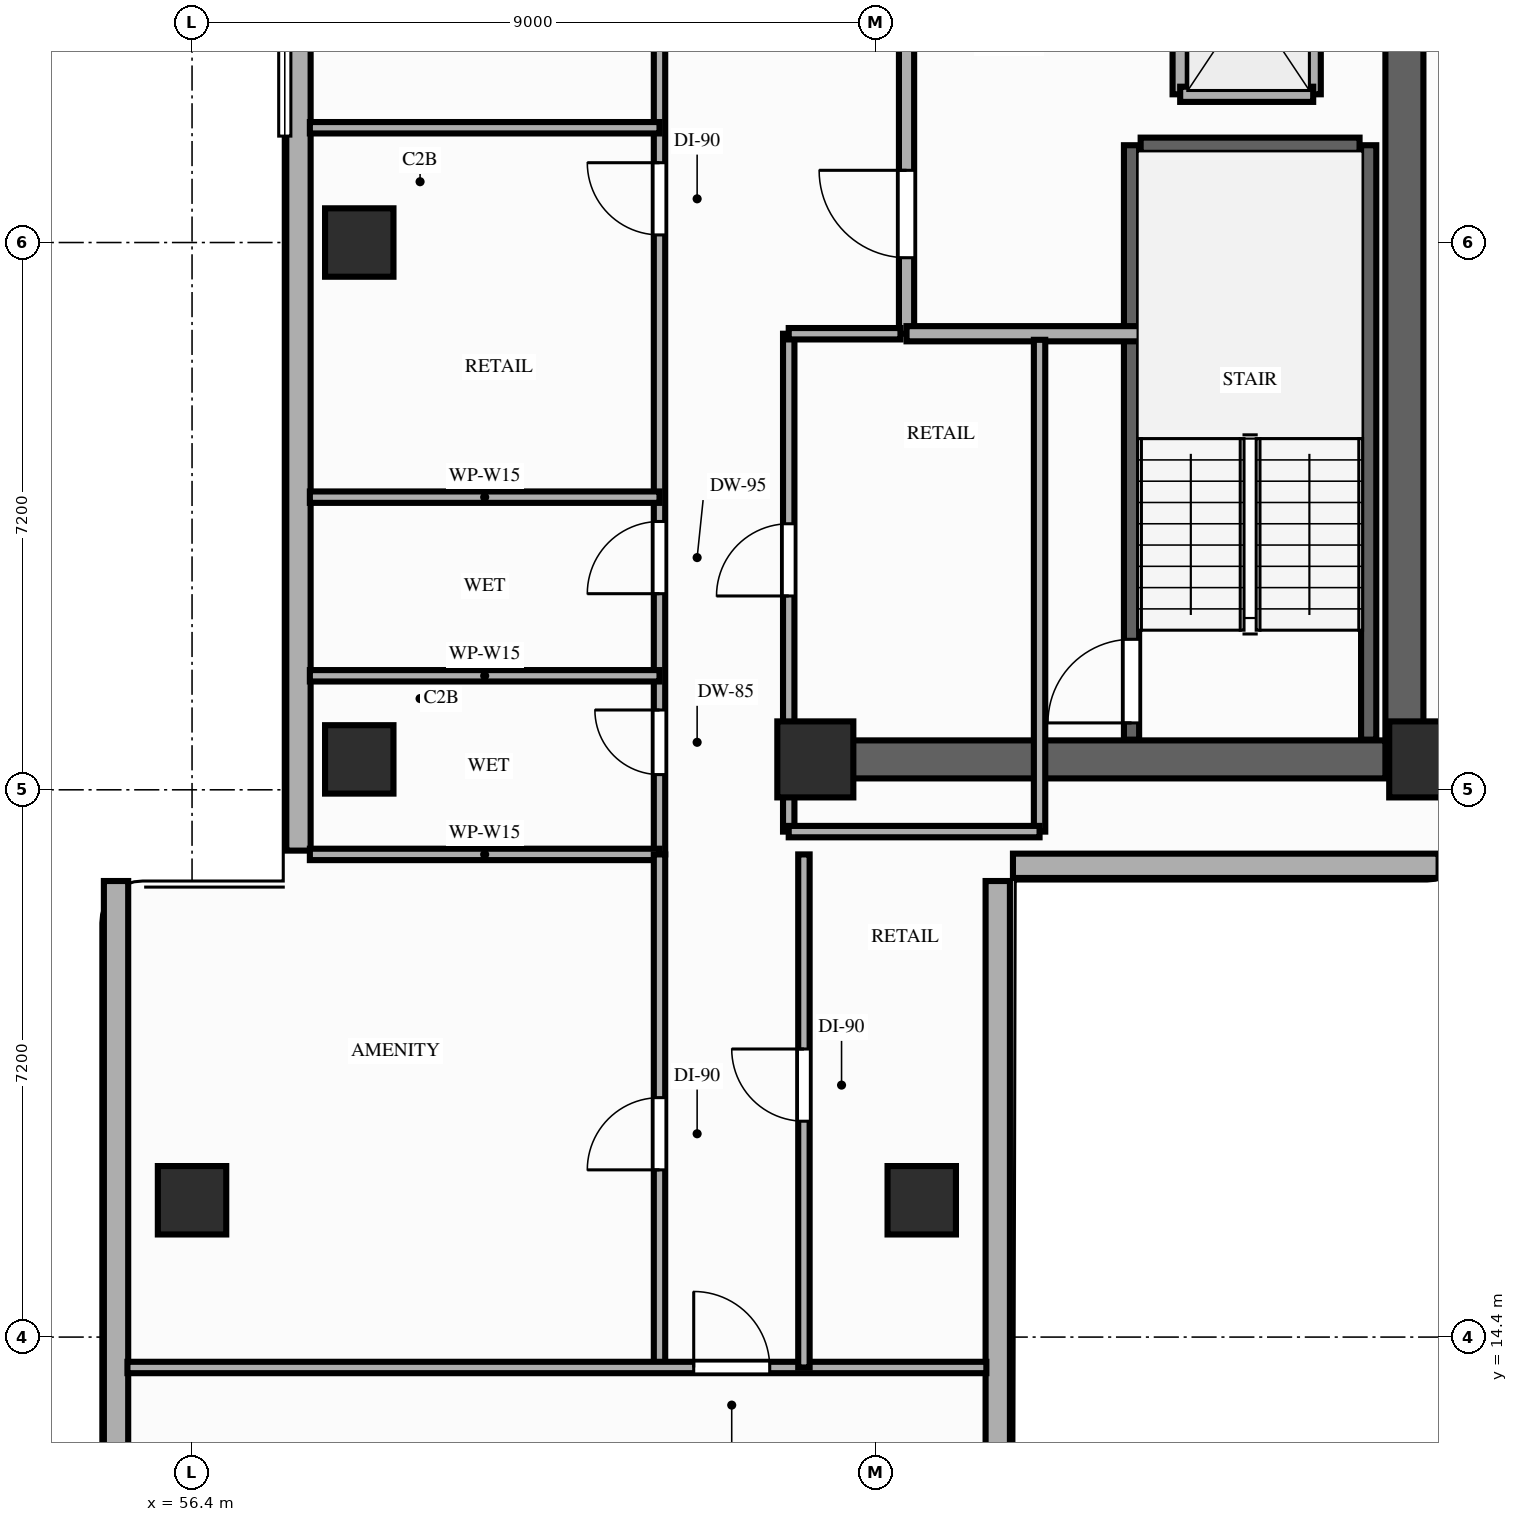
"""IFC4 building model, lengths in metres.
Left out: names, types, materials, properties, quantities, classifications, styles, units other than length and angle.
Written with IfcOpenShell. Run it as: python <this file> out.ifc"""

import sys

from ifc_helpers import new_model, si_unit, direction, frame, frame_2d, origin, origin_2d, place, context, subcontext, project, spatial, rectangle, extrude, element, fill, save


model = new_model("IFC4")
c1 = context("Model", 3, precision=1e-05, world=origin(), true_north=direction((0.0, 1.0)))
c2 = subcontext(c1, "Body", "Model", "MODEL_VIEW")
j1 = project(units=[si_unit("LENGTHUNIT", "METRE"), si_unit("PLANEANGLEUNIT", "RADIAN")], contexts=[c1])
p1 = place(None, origin())
s1 = spatial("IfcSite", under=j1, at=p1, CompositionType="ELEMENT")
p2 = place(p1, origin())
s2 = spatial("IfcBuilding", under=s1, at=p2, CompositionType="ELEMENT")
p3 = place(p2, frame((0.0, 0.0, 56.4)))
s3 = spatial("IfcBuildingStorey", under=s2, at=p3, CompositionType="ELEMENT", Elevation=56.4)
for number, where, z_axis, x_axis in (
    (1, (64.6, 22.0, 0.0), (0.0, 0.0, 1.0), (1.0, 0.0, 0.0)),
    (2, (72.65, 22.0, 0.0), (0.0, 0.0, 1.0), (1.0, 0.0, 0.0)),
):
    element("IfcColumn", number, at=place(p3, frame(where, z_axis=z_axis, x_axis=x_axis)), inside=s3, PredefinedType="COLUMN", context=c2, shape_type="SweptSolid", body=[
        extrude(rectangle(XDim=1.0, YDim=1.0, at=origin_2d()), origin(), (0.0, 0.0, 1.0), 3.2),
    ])
for number, where, z_axis, x_axis in (
    (3, (58.6, 22.0, 0.0), (0.0, 0.0, 1.0), (1.0, 0.0, 0.0)),
    (4, (58.6, 28.8, 0.0), (0.0, 0.0, 1.0), (1.0, 0.0, 0.0)),
    (5, (56.4, 16.2, 0.0), (0.0, 0.0, 1.0), (1.0, 0.0, 0.0)),
    (6, (66.0, 16.2, 0.0), (0.0, 0.0, 1.0), (1.0, 0.0, 0.0)),
):
    element("IfcColumn", number, at=place(p3, frame(where, z_axis=z_axis, x_axis=x_axis)), inside=s3, PredefinedType="COLUMN", context=c2, shape_type="SweptSolid", body=[
        extrude(rectangle(XDim=0.9, YDim=0.9, at=origin_2d()), origin(), (0.0, 0.0, 1.0), 3.2),
    ])
p4 = place(p3, frame((57.8, 43.4, 0.0), z_axis=(0.0, 0.0, 1.0), x_axis=(0.0, -1.0, 0.0)))
e7 = element("IfcWall", 7, at=p4, inside=s3, PredefinedType="STANDARD", context=c2, shape_type="SweptSolid", body=[
    extrude(rectangle(XDim=22.6, YDim=0.32, at=frame_2d((11.3, 0.0))), origin(), (0.0, 0.0, 1.0), 2.51),
])
p5 = place(p4, frame((3.6, 0.0, 0.85)))
e8 = element("IfcOpeningElement", 8, at=p5, cuts=e7, PredefinedType="OPENING", context=c2, shape_type="SweptSolid", body=[
    extrude(rectangle(XDim=1.6, YDim=1.36, at=frame_2d((0.8, 0.68))), frame((0.0, 0.17, 0.0), z_axis=(0.0, -1.0, 0.0), x_axis=(1.0, 0.0, 0.0)), (0.0, 0.0, 1.0), 0.34),
])
for number, where, z_axis, x_axis in (
    (9, (55.4, 20.4, 0.0), (0.0, 0.0, 1.0), (0.0, -1.0, 0.0)),
    (10, (67.0, 7.6, 0.0), (0.0, 0.0, 1.0), (0.0, 1.0, 0.0)),
):
    element("IfcWall", number, at=place(p3, frame(where, z_axis=z_axis, x_axis=x_axis)), inside=s3, PredefinedType="STANDARD", context=c2, shape_type="SweptSolid", body=[
        extrude(rectangle(XDim=12.8, YDim=0.32, at=frame_2d((6.4, 0.0))), origin(), (0.0, 0.0, 1.0), 3.02),
    ])
p6 = place(p3, frame((67.2, 20.6, 0.0), z_axis=(0.0, 0.0, 1.0), x_axis=(1.0, 0.0, 0.0)))
e11 = element("IfcWall", 11, at=p6, inside=s3, PredefinedType="STANDARD", context=c2, shape_type="SweptSolid", body=[
    extrude(rectangle(XDim=5.6, YDim=0.32, at=frame_2d((2.8, 0.0))), origin(), (0.0, 0.0, 1.0), 3.02),
])
p7 = place(p3, frame((72.35, 22.0, 0.0), z_axis=(0.0, 0.0, 1.0), x_axis=(0.0, 1.0, 0.0)))
e12 = element("IfcWall", 12, at=p7, inside=s3, PredefinedType="SHEAR", context=c2, shape_type="SweptSolid", body=[
    extrude(rectangle(XDim=20.25, YDim=0.5, at=frame_2d((10.125, 0.0))), origin(), (0.0, 0.0, 1.0), 3.02),
])
p8 = place(p3, frame((64.6, 22.0, 0.0), z_axis=(0.0, 0.0, 1.0), x_axis=(1.0, 0.0, 0.0)))
e13 = element("IfcWall", 13, at=p8, inside=s3, PredefinedType="SHEAR", context=c2, shape_type="SweptSolid", body=[
    extrude(rectangle(XDim=7.5, YDim=0.5, at=frame_2d((3.75, 0.0))), origin(), (0.0, 0.0, 1.0), 3.02),
])
p9 = place(p3, frame((68.76, 22.26, 0.0), z_axis=(0.0, 0.0, 1.0), x_axis=(0.0, 1.0, 0.0)))
e14 = element("IfcWall", 14, at=p9, inside=s3, PredefinedType="SHEAR", context=c2, shape_type="SweptSolid", body=[
    extrude(rectangle(XDim=7.82, YDim=0.2, at=frame_2d((3.91, 0.0))), origin(), (0.0, 0.0, 1.0), 3.02),
])
p10 = place(p9, frame((0.22, 0.0, 0.0)))
e15 = element("IfcOpeningElement", 15, at=p10, cuts=e14, PredefinedType="OPENING", context=c2, shape_type="SweptSolid", body=[
    extrude(rectangle(XDim=1.1, YDim=2.15, at=frame_2d((0.55, 1.075))), frame((0.0, 0.11, 0.0), z_axis=(0.0, -1.0, 0.0), x_axis=(1.0, 0.0, 0.0)), (0.0, 0.0, 1.0), 0.22),
])
p11 = place(p3, frame((71.88, 22.26, 0.0), z_axis=(0.0, 0.0, 1.0), x_axis=(0.0, 1.0, 0.0)))
e16 = element("IfcWall", 16, at=p11, inside=s3, PredefinedType="SHEAR", context=c2, shape_type="SweptSolid", body=[
    extrude(rectangle(XDim=7.82, YDim=0.2, at=frame_2d((3.91, 0.0))), origin(), (0.0, 0.0, 1.0), 3.02),
])
p12 = place(p3, frame((68.88, 30.08, 0.0), z_axis=(0.0, 0.0, 1.0), x_axis=(1.0, 0.0, 0.0)))
e17 = element("IfcWall", 17, at=p12, inside=s3, PredefinedType="SHEAR", context=c2, shape_type="SweptSolid", body=[
    extrude(rectangle(XDim=2.88, YDim=0.2, at=frame_2d((1.44, 0.0))), origin(), (0.0, 0.0, 1.0), 3.02),
])
p13 = place(p3, frame((69.4, 30.75, 0.0), z_axis=(0.0, 0.0, 1.0), x_axis=(0.0, 1.0, 0.0)))
e18 = element("IfcWall", 18, at=p13, inside=s3, PredefinedType="MOVABLE", context=c2, shape_type="SweptSolid", body=[
    extrude(rectangle(XDim=2.45, YDim=0.2, at=frame_2d((1.225, 0.0))), origin(), (0.0, 0.0, 1.0), 3.02),
])
p14 = place(p13, frame((0.65, 0.0, 0.0)))
e19 = element("IfcOpeningElement", 19, at=p14, cuts=e18, PredefinedType="OPENING", context=c2, shape_type="SweptSolid", body=[
    extrude(rectangle(XDim=1.05, YDim=2.15, at=frame_2d((0.525, 1.075))), frame((0.0, 0.11, 0.0), z_axis=(0.0, -1.0, 0.0), x_axis=(1.0, 0.0, 0.0)), (0.0, 0.0, 1.0), 0.22),
])
p15 = place(p3, frame((71.15, 30.75, 0.0), z_axis=(0.0, 0.0, 1.0), x_axis=(0.0, 1.0, 0.0)))
e20 = element("IfcWall", 20, at=p15, inside=s3, PredefinedType="MOVABLE", context=c2, shape_type="SweptSolid", body=[
    extrude(rectangle(XDim=2.45, YDim=0.2, at=frame_2d((1.225, 0.0))), origin(), (0.0, 0.0, 1.0), 3.02),
])
p16 = place(p3, frame((69.4, 30.75, 0.0), z_axis=(0.0, 0.0, 1.0), x_axis=(1.0, 0.0, 0.0)))
e21 = element("IfcWall", 21, at=p16, inside=s3, PredefinedType="MOVABLE", context=c2, shape_type="SweptSolid", body=[
    extrude(rectangle(XDim=1.75, YDim=0.2, at=frame_2d((0.875, 0.0))), origin(), (0.0, 0.0, 1.0), 3.02),
])
p17 = place(p3, frame((65.8, 27.6, 0.0), z_axis=(0.0, 0.0, 1.0), x_axis=(0.0, 1.0, 0.0)))
e22 = element("IfcWall", 22, at=p17, inside=s3, PredefinedType="PARTITIONING", context=c2, shape_type="SweptSolid", body=[
    extrude(rectangle(XDim=5.5, YDim=0.2, at=frame_2d((2.75, 0.0))), origin(), (0.0, 0.0, 1.0), 3.02),
])
p18 = place(p17, frame((1.0, 0.0, 0.0)))
e23 = element("IfcOpeningElement", 23, at=p18, cuts=e22, PredefinedType="OPENING", context=c2, shape_type="SweptSolid", body=[
    extrude(rectangle(XDim=1.15, YDim=2.15, at=frame_2d((0.575, 1.075))), frame((0.0, 0.11, 0.0), z_axis=(0.0, -1.0, 0.0), x_axis=(1.0, 0.0, 0.0)), (0.0, 0.0, 1.0), 0.22),
])
p19 = place(p3, frame((65.8, 27.6, 0.0), z_axis=(0.0, 0.0, 1.0), x_axis=(1.0, 0.0, 0.0)))
e24 = element("IfcWall", 24, at=p19, inside=s3, PredefinedType="PARTITIONING", context=c2, shape_type="SweptSolid", body=[
    extrude(rectangle(XDim=3.4, YDim=0.2, at=frame_2d((1.7, 0.0))), origin(), (0.0, 0.0, 1.0), 3.02),
])
p20 = place(p3, frame((64.25, 21.05, 0.0), z_axis=(0.0, 0.0, 1.0), x_axis=(0.0, 1.0, 0.0)))
e25 = element("IfcWall", 25, at=p20, inside=s3, PredefinedType="PARTITIONING", context=c2, shape_type="SweptSolid", body=[
    extrude(rectangle(XDim=6.55, YDim=0.15, at=frame_2d((3.275, 0.0))), origin(), (0.0, 0.0, 1.0), 2.51),
])
p21 = place(p20, frame((3.1, 0.0, 0.0)))
e26 = element("IfcOpeningElement", 26, at=p21, cuts=e25, PredefinedType="OPENING", context=c2, shape_type="SweptSolid", body=[
    extrude(rectangle(XDim=0.95, YDim=2.15, at=frame_2d((0.475, 1.075))), frame((0.0, 0.085, 0.0), z_axis=(0.0, -1.0, 0.0), x_axis=(1.0, 0.0, 0.0)), (0.0, 0.0, 1.0), 0.17),
])
p22 = place(p3, frame((67.55, 21.05, 0.0), z_axis=(0.0, 0.0, 1.0), x_axis=(0.0, 1.0, 0.0)))
e27 = element("IfcWall", 27, at=p22, inside=s3, PredefinedType="PARTITIONING", context=c2, shape_type="SweptSolid", body=[
    extrude(rectangle(XDim=6.47, YDim=0.15, at=frame_2d((3.235, 0.0))), origin(), (0.0, 0.0, 1.0), 2.51),
])
p23 = place(p3, frame((64.25, 21.05, 0.0), z_axis=(0.0, 0.0, 1.0), x_axis=(1.0, 0.0, 0.0)))
e28 = element("IfcWall", 28, at=p23, inside=s3, PredefinedType="PARTITIONING", context=c2, shape_type="SweptSolid", body=[
    extrude(rectangle(XDim=3.3, YDim=0.15, at=frame_2d((1.65, 0.0))), origin(), (0.0, 0.0, 1.0), 2.51),
])
p24 = place(p3, frame((64.25, 27.6, 0.0), z_axis=(0.0, 0.0, 1.0), x_axis=(1.0, 0.0, 0.0)))
e29 = element("IfcWall", 29, at=p24, inside=s3, PredefinedType="PARTITIONING", context=c2, shape_type="SweptSolid", body=[
    extrude(rectangle(XDim=1.47, YDim=0.15, at=frame_2d((0.735, 0.0))), origin(), (0.0, 0.0, 1.0), 2.51),
])
p25 = place(p3, frame((62.55, 20.75, 0.0), z_axis=(0.0, 0.0, 1.0), x_axis=(0.0, 1.0, 0.0)))
e30 = element("IfcWall", 30, at=p25, inside=s3, PredefinedType="PARTITIONING", context=c2, shape_type="SweptSolid", body=[
    extrude(rectangle(XDim=22.7, YDim=0.15, at=frame_2d((11.35, 0.0))), origin(), (0.0, 0.0, 1.0), 2.51),
])
p26 = place(p25, frame((1.05, 0.0, 0.0)))
e31 = element("IfcOpeningElement", 31, at=p26, cuts=e30, PredefinedType="OPENING", context=c2, shape_type="SweptSolid", body=[
    extrude(rectangle(XDim=0.85, YDim=2.1, at=frame_2d((0.425, 1.05))), frame((0.0, 0.085, 0.0), z_axis=(0.0, -1.0, 0.0), x_axis=(1.0, 0.0, 0.0)), (0.0, 0.0, 1.0), 0.17),
])
p27 = place(p25, frame((3.43, 0.0, 0.0)))
e32 = element("IfcOpeningElement", 32, at=p27, cuts=e30, PredefinedType="OPENING", context=c2, shape_type="SweptSolid", body=[
    extrude(rectangle(XDim=0.95, YDim=2.1, at=frame_2d((0.475, 1.05))), frame((0.0, 0.085, 0.0), z_axis=(0.0, -1.0, 0.0), x_axis=(1.0, 0.0, 0.0)), (0.0, 0.0, 1.0), 0.17),
])
p28 = place(p25, frame((8.15, 0.0, 0.0)))
e33 = element("IfcOpeningElement", 33, at=p28, cuts=e30, PredefinedType="OPENING", context=c2, shape_type="SweptSolid", body=[
    extrude(rectangle(XDim=0.95, YDim=2.15, at=frame_2d((0.475, 1.075))), frame((0.0, 0.085, 0.0), z_axis=(0.0, -1.0, 0.0), x_axis=(1.0, 0.0, 0.0)), (0.0, 0.0, 1.0), 0.17),
])
p29 = place(p25, frame((12.14, 0.0, 0.0)))
e34 = element("IfcOpeningElement", 34, at=p29, cuts=e30, PredefinedType="OPENING", context=c2, shape_type="SweptSolid", body=[
    extrude(rectangle(XDim=0.95, YDim=2.15, at=frame_2d((0.475, 1.075))), frame((0.0, 0.085, 0.0), z_axis=(0.0, -1.0, 0.0), x_axis=(1.0, 0.0, 0.0)), (0.0, 0.0, 1.0), 0.17),
])
p30 = place(p25, frame((18.71, 0.0, 0.0)))
e35 = element("IfcOpeningElement", 35, at=p30, cuts=e30, PredefinedType="OPENING", context=c2, shape_type="SweptSolid", body=[
    extrude(rectangle(XDim=0.95, YDim=2.15, at=frame_2d((0.475, 1.075))), frame((0.0, 0.085, 0.0), z_axis=(0.0, -1.0, 0.0), x_axis=(1.0, 0.0, 0.0)), (0.0, 0.0, 1.0), 0.17),
])
for number, where, z_axis, x_axis in (
    (36, (57.95, 20.75, 0.0), (0.0, 0.0, 1.0), (1.0, 0.0, 0.0)),
    (37, (57.95, 23.1, 0.0), (0.0, 0.0, 1.0), (1.0, 0.0, 0.0)),
    (38, (57.95, 25.45, 0.0), (0.0, 0.0, 1.0), (1.0, 0.0, 0.0)),
    (39, (57.95, 30.31, 0.0), (0.0, 0.0, 1.0), (1.0, 0.0, 0.0)),
):
    element("IfcWall", number, at=place(p3, frame(where, z_axis=z_axis, x_axis=x_axis)), inside=s3, PredefinedType="PARTITIONING", context=c2, shape_type="SweptSolid", body=[
        extrude(rectangle(XDim=4.6, YDim=0.15, at=frame_2d((2.3, 0.0))), origin(), (0.0, 0.0, 1.0), 2.51),
    ])
p31 = place(p3, frame((62.55, 14.0, 0.0), z_axis=(0.0, 0.0, 1.0), x_axis=(0.0, 1.0, 0.0)))
e40 = element("IfcWall", 40, at=p31, inside=s3, PredefinedType="PARTITIONING", context=c2, shape_type="SweptSolid", body=[
    extrude(rectangle(XDim=6.75, YDim=0.15, at=frame_2d((3.375, 0.0))), origin(), (0.0, 0.0, 1.0), 2.51),
])
p32 = place(p31, frame((2.6, 0.0, 0.0)))
e41 = element("IfcOpeningElement", 41, at=p32, cuts=e40, PredefinedType="OPENING", context=c2, shape_type="SweptSolid", body=[
    extrude(rectangle(XDim=0.95, YDim=2.15, at=frame_2d((0.475, 1.075))), frame((0.0, 0.085, 0.0), z_axis=(0.0, -1.0, 0.0), x_axis=(1.0, 0.0, 0.0)), (0.0, 0.0, 1.0), 0.17),
])
p33 = place(p3, frame((55.55, 14.0, 0.0), z_axis=(0.0, 0.0, 1.0), x_axis=(1.0, 0.0, 0.0)))
e42 = element("IfcWall", 42, at=p33, inside=s3, PredefinedType="PARTITIONING", context=c2, shape_type="SweptSolid", body=[
    extrude(rectangle(XDim=11.3, YDim=0.15, at=frame_2d((5.65, 0.0))), origin(), (0.0, 0.0, 1.0), 2.51),
])
p34 = place(p33, frame((7.45, 0.0, 0.0)))
e43 = element("IfcOpeningElement", 43, at=p34, cuts=e42, PredefinedType="OPENING", context=c2, shape_type="SweptSolid", body=[
    extrude(rectangle(XDim=1.0, YDim=2.15, at=frame_2d((0.5, 1.075))), frame((0.0, 0.085, 0.0), z_axis=(0.0, -1.0, 0.0), x_axis=(1.0, 0.0, 0.0)), (0.0, 0.0, 1.0), 0.17),
])
p35 = place(p3, frame((64.45, 14.0, 0.0), z_axis=(0.0, 0.0, 1.0), x_axis=(0.0, 1.0, 0.0)))
e44 = element("IfcWall", 44, at=p35, inside=s3, PredefinedType="PARTITIONING", context=c2, shape_type="SweptSolid", body=[
    extrude(rectangle(XDim=6.75, YDim=0.15, at=frame_2d((3.375, 0.0))), origin(), (0.0, 0.0, 1.0), 2.51),
])
p36 = place(p35, frame((3.24, 0.0, 0.0)))
e45 = element("IfcOpeningElement", 45, at=p36, cuts=e44, PredefinedType="OPENING", context=c2, shape_type="SweptSolid", body=[
    extrude(rectangle(XDim=0.95, YDim=2.15, at=frame_2d((0.475, 1.075))), frame((0.0, 0.085, 0.0), z_axis=(0.0, -1.0, 0.0), x_axis=(1.0, 0.0, 0.0)), (0.0, 0.0, 1.0), 0.17),
])
p37 = place(p10, origin())
e46 = element("IfcDoor", 46, at=p37, inside=s3, OperationType="SINGLE_SWING_LEFT", PredefinedType="DOOR", context=c2, shape_type="SweptSolid", body=[
    extrude(rectangle(XDim=1.1, YDim=2.15, at=frame_2d((0.55, 1.075))), frame((0.0, 0.025, 0.0), z_axis=(0.0, -1.0, 0.0), x_axis=(1.0, 0.0, 0.0)), (0.0, 0.0, 1.0), 0.05),
])
fill(e15, e46)
p38 = place(p18, origin())
e47 = element("IfcDoor", 47, at=p38, inside=s3, OperationType="SINGLE_SWING_RIGHT", PredefinedType="DOOR", context=c2, shape_type="SweptSolid", body=[
    extrude(rectangle(XDim=1.15, YDim=2.15, at=frame_2d((0.575, 1.075))), frame((0.0, 0.025, 0.0), z_axis=(0.0, -1.0, 0.0), x_axis=(1.0, 0.0, 0.0)), (0.0, 0.0, 1.0), 0.05),
])
fill(e23, e47)
p39 = place(p21, origin())
e48 = element("IfcDoor", 48, at=p39, inside=s3, OperationType="SINGLE_SWING_LEFT", PredefinedType="DOOR", context=c2, shape_type="SweptSolid", body=[
    extrude(rectangle(XDim=0.95, YDim=2.15, at=frame_2d((0.475, 1.075))), frame((0.0, 0.025, 0.0), z_axis=(0.0, -1.0, 0.0), x_axis=(1.0, 0.0, 0.0)), (0.0, 0.0, 1.0), 0.05),
])
fill(e26, e48)
p40 = place(p26, origin())
e49 = element("IfcDoor", 49, at=p40, inside=s3, OperationType="SINGLE_SWING_RIGHT", PredefinedType="DOOR", context=c2, shape_type="SweptSolid", body=[
    extrude(rectangle(XDim=0.85, YDim=2.1, at=frame_2d((0.425, 1.05))), frame((0.0, 0.025, 0.0), z_axis=(0.0, -1.0, 0.0), x_axis=(1.0, 0.0, 0.0)), (0.0, 0.0, 1.0), 0.05),
])
fill(e31, e49)
p41 = place(p27, origin())
e50 = element("IfcDoor", 50, at=p41, inside=s3, OperationType="SINGLE_SWING_LEFT", PredefinedType="DOOR", context=c2, shape_type="SweptSolid", body=[
    extrude(rectangle(XDim=0.95, YDim=2.1, at=frame_2d((0.475, 1.05))), frame((0.0, 0.025, 0.0), z_axis=(0.0, -1.0, 0.0), x_axis=(1.0, 0.0, 0.0)), (0.0, 0.0, 1.0), 0.05),
])
fill(e32, e50)
p42 = place(p28, origin())
e51 = element("IfcDoor", 51, at=p42, inside=s3, OperationType="SINGLE_SWING_RIGHT", PredefinedType="DOOR", context=c2, shape_type="SweptSolid", body=[
    extrude(rectangle(XDim=0.95, YDim=2.15, at=frame_2d((0.475, 1.075))), frame((0.0, 0.025, 0.0), z_axis=(0.0, -1.0, 0.0), x_axis=(1.0, 0.0, 0.0)), (0.0, 0.0, 1.0), 0.05),
])
fill(e33, e51)
p43 = place(p32, origin())
e52 = element("IfcDoor", 52, at=p43, inside=s3, OperationType="SINGLE_SWING_LEFT", PredefinedType="DOOR", context=c2, shape_type="SweptSolid", body=[
    extrude(rectangle(XDim=0.95, YDim=2.15, at=frame_2d((0.475, 1.075))), frame((0.0, 0.025, 0.0), z_axis=(0.0, -1.0, 0.0), x_axis=(1.0, 0.0, 0.0)), (0.0, 0.0, 1.0), 0.05),
])
fill(e41, e52)
p44 = place(p36, origin())
e53 = element("IfcDoor", 53, at=p44, inside=s3, OperationType="SINGLE_SWING_RIGHT", PredefinedType="DOOR", context=c2, shape_type="SweptSolid", body=[
    extrude(rectangle(XDim=0.95, YDim=2.15, at=frame_2d((0.475, 1.075))), frame((0.0, 0.025, 0.0), z_axis=(0.0, -1.0, 0.0), x_axis=(1.0, 0.0, 0.0)), (0.0, 0.0, 1.0), 0.05),
])
fill(e45, e53)
p45 = place(p34, origin())
e54 = element("IfcDoor", 54, at=p45, inside=s3, OperationType="SINGLE_SWING_LEFT", PredefinedType="DOOR", context=c2, shape_type="SweptSolid", body=[
    extrude(rectangle(XDim=1.0, YDim=2.15, at=frame_2d((0.5, 1.075))), frame((0.0, 0.025, 0.0), z_axis=(0.0, -1.0, 0.0), x_axis=(1.0, 0.0, 0.0)), (0.0, 0.0, 1.0), 0.05),
])
fill(e43, e54)
save(model, sys.argv[1])
